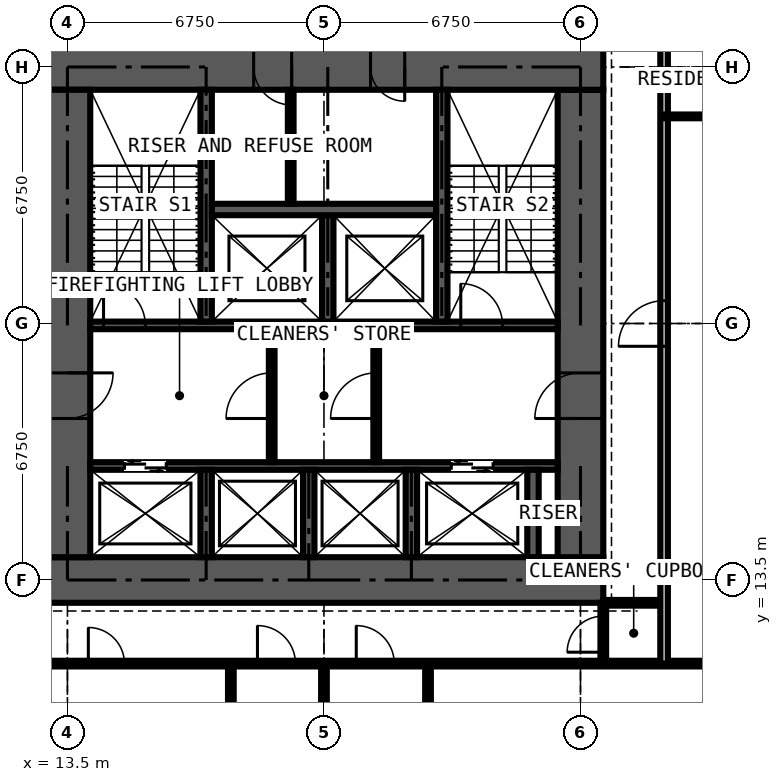
"""IFC4 building model, lengths in metres.
Left out: names, types, materials, properties, quantities, classifications, styles, units other than length and angle.
Written with IfcOpenShell. Run it as: python <this file> out.ifc"""

import sys

from ifc_helpers import new_model, si_unit, direction, frame, frame_2d, origin, place, context, subcontext, project, spatial, rectangle, extrude, element, fill, save


model = new_model("IFC4")
c1 = context("Model", 3, precision=1e-05, world=origin(), true_north=direction((0.0, 1.0)))
c2 = subcontext(c1, "Body", "Model", "MODEL_VIEW")
j1 = project(units=[si_unit("LENGTHUNIT", "METRE"), si_unit("PLANEANGLEUNIT", "RADIAN")], contexts=[c1])
p1 = place(None, origin())
s1 = spatial("IfcSite", under=j1, at=p1, CompositionType="ELEMENT")
p2 = place(p1, origin())
s2 = spatial("IfcBuilding", under=s1, at=p2, CompositionType="ELEMENT")
p3 = place(p2, frame((0.0, 0.0, 39.6)))
s3 = spatial("IfcBuildingStorey", under=s2, at=p3, CompositionType="ELEMENT", Elevation=39.6)
p4 = place(p3, frame((12.9, 13.5, 0.0), z_axis=(0.0, 0.0, 1.0), x_axis=(1.0, 0.0, 0.0)))
e1 = element("IfcWall", 1, at=p4, inside=s3, PredefinedType="SHEAR", context=c2, shape_type="SweptSolid", body=[
    extrude(rectangle(XDim=14.7, YDim=1.2, at=frame_2d((7.35, 0.0))), origin(), (0.0, 0.0, 1.0), 3.6),
])
p5 = place(p3, frame((27.0, 14.1, 0.0), z_axis=(0.0, 0.0, 1.0), x_axis=(0.0, 1.0, 0.0)))
e2 = element("IfcWall", 2, at=p5, inside=s3, PredefinedType="SHEAR", context=c2, shape_type="SweptSolid", body=[
    extrude(rectangle(XDim=12.3, YDim=1.2, at=frame_2d((6.15, 0.0))), origin(), (0.0, 0.0, 1.0), 3.6),
])
p6 = place(p5, frame((3.65, 0.0, 0.0)))
e3 = element("IfcOpeningElement", 3, at=p6, cuts=e2, PredefinedType="OPENING", context=c2, shape_type="SweptSolid", body=[
    extrude(rectangle(XDim=1.2, YDim=2.2, at=frame_2d((0.6, 1.1))), frame((0.0, 0.61, 0.0), z_axis=(0.0, -1.0, 0.0), x_axis=(1.0, 0.0, 0.0)), (0.0, 0.0, 1.0), 1.22),
])
p7 = place(p3, frame((27.6, 27.0, 0.0), z_axis=(0.0, 0.0, 1.0), x_axis=(-1.0, 0.0, 0.0)))
e4 = element("IfcWall", 4, at=p7, inside=s3, PredefinedType="SHEAR", context=c2, shape_type="SweptSolid", body=[
    extrude(rectangle(XDim=14.7, YDim=1.2, at=frame_2d((7.35, 0.0))), origin(), (0.0, 0.0, 1.0), 3.6),
])
p8 = place(p7, frame((5.225, 0.0, 0.0)))
e5 = element("IfcOpeningElement", 5, at=p8, cuts=e4, PredefinedType="OPENING", context=c2, shape_type="SweptSolid", body=[
    extrude(rectangle(XDim=0.9, YDim=2.2, at=frame_2d((0.45, 1.1))), frame((0.0, 0.61, 0.0), z_axis=(0.0, -1.0, 0.0), x_axis=(1.0, 0.0, 0.0)), (0.0, 0.0, 1.0), 1.22),
])
p9 = place(p7, frame((8.2, 0.0, 0.0)))
e6 = element("IfcOpeningElement", 6, at=p9, cuts=e4, PredefinedType="OPENING", context=c2, shape_type="SweptSolid", body=[
    extrude(rectangle(XDim=1.0, YDim=2.2, at=frame_2d((0.5, 1.1))), frame((0.0, 0.61, 0.0), z_axis=(0.0, -1.0, 0.0), x_axis=(1.0, 0.0, 0.0)), (0.0, 0.0, 1.0), 1.22),
])
p10 = place(p3, frame((13.5, 26.4, 0.0), z_axis=(0.0, 0.0, 1.0), x_axis=(0.0, -1.0, 0.0)))
e7 = element("IfcWall", 7, at=p10, inside=s3, PredefinedType="SHEAR", context=c2, shape_type="SweptSolid", body=[
    extrude(rectangle(XDim=12.3, YDim=1.2, at=frame_2d((6.15, 0.0))), origin(), (0.0, 0.0, 1.0), 3.6),
])
p11 = place(p10, frame((7.45, 0.0, 0.0)))
e8 = element("IfcOpeningElement", 8, at=p11, cuts=e7, PredefinedType="OPENING", context=c2, shape_type="SweptSolid", body=[
    extrude(rectangle(XDim=1.2, YDim=2.2, at=frame_2d((0.6, 1.1))), frame((0.0, 0.61, 0.0), z_axis=(0.0, -1.0, 0.0), x_axis=(1.0, 0.0, 0.0)), (0.0, 0.0, 1.0), 1.22),
])
p12 = place(p3, frame((14.1, 16.5, 0.0), z_axis=(0.0, 0.0, 1.0), x_axis=(1.0, 0.0, 0.0)))
e9 = element("IfcWall", 9, at=p12, inside=s3, PredefinedType="SHEAR", context=c2, shape_type="SweptSolid", body=[
    extrude(rectangle(XDim=12.3, YDim=0.2, at=frame_2d((6.15, 0.0))), origin(), (0.0, 0.0, 1.0), 3.6),
])
p13 = place(p12, frame((0.9, 0.0, 0.0)))
e10 = element("IfcOpeningElement", 10, at=p13, cuts=e9, PredefinedType="OPENING", context=c2, shape_type="SweptSolid", body=[
    extrude(rectangle(XDim=1.1, YDim=2.2, at=frame_2d((0.55, 1.1))), frame((0.0, 0.11, 0.0), z_axis=(0.0, -1.0, 0.0), x_axis=(1.0, 0.0, 0.0)), (0.0, 0.0, 1.0), 0.22),
])
p14 = place(p12, frame((9.5, 0.0, 0.0)))
e11 = element("IfcOpeningElement", 11, at=p14, cuts=e9, PredefinedType="OPENING", context=c2, shape_type="SweptSolid", body=[
    extrude(rectangle(XDim=1.1, YDim=2.2, at=frame_2d((0.55, 1.1))), frame((0.0, 0.11, 0.0), z_axis=(0.0, -1.0, 0.0), x_axis=(1.0, 0.0, 0.0)), (0.0, 0.0, 1.0), 0.22),
])
p15 = place(p3, frame((14.1, 20.2, 0.0), z_axis=(0.0, 0.0, 1.0), x_axis=(1.0, 0.0, 0.0)))
e12 = element("IfcWall", 12, at=p15, inside=s3, PredefinedType="SHEAR", context=c2, shape_type="SweptSolid", body=[
    extrude(rectangle(XDim=12.3, YDim=0.2, at=frame_2d((6.15, 0.0))), origin(), (0.0, 0.0, 1.0), 3.6),
])
p16 = place(p15, frame((0.35, 0.0, 0.0)))
e13 = element("IfcOpeningElement", 13, at=p16, cuts=e12, PredefinedType="OPENING", context=c2, shape_type="SweptSolid", body=[
    extrude(rectangle(XDim=1.1, YDim=2.2, at=frame_2d((0.55, 1.1))), frame((0.0, 0.11, 0.0), z_axis=(0.0, -1.0, 0.0), x_axis=(1.0, 0.0, 0.0)), (0.0, 0.0, 1.0), 0.22),
])
p17 = place(p15, frame((9.75, 0.0, 0.0)))
e14 = element("IfcOpeningElement", 14, at=p17, cuts=e12, PredefinedType="OPENING", context=c2, shape_type="SweptSolid", body=[
    extrude(rectangle(XDim=1.1, YDim=2.2, at=frame_2d((0.55, 1.1))), frame((0.0, 0.11, 0.0), z_axis=(0.0, -1.0, 0.0), x_axis=(1.0, 0.0, 0.0)), (0.0, 0.0, 1.0), 0.22),
])
for number, where, z_axis, x_axis in (
    (15, (17.15, 20.3, 0.0), (0.0, 0.0, 1.0), (0.0, 1.0, 0.0)),
    (16, (23.35, 20.3, 0.0), (0.0, 0.0, 1.0), (0.0, 1.0, 0.0)),
):
    element("IfcWall", number, at=place(p3, frame(where, z_axis=z_axis, x_axis=x_axis)), inside=s3, PredefinedType="SHEAR", context=c2, shape_type="SweptSolid", body=[
        extrude(rectangle(XDim=6.1, YDim=0.3, at=frame_2d((3.05, 0.0))), origin(), (0.0, 0.0, 1.0), 3.6),
    ])
p18 = place(p3, frame((20.35, 20.3, 0.0), z_axis=(0.0, 0.0, 1.0), x_axis=(0.0, 1.0, 0.0)))
e17 = element("IfcWall", 17, at=p18, inside=s3, PredefinedType="SHEAR", context=c2, shape_type="SweptSolid", body=[
    extrude(rectangle(XDim=2.8, YDim=0.3, at=frame_2d((1.4, 0.0))), origin(), (0.0, 0.0, 1.0), 3.6),
])
p19 = place(p3, frame((17.3, 23.25, 0.0), z_axis=(0.0, 0.0, 1.0), x_axis=(1.0, 0.0, 0.0)))
e18 = element("IfcWall", 18, at=p19, inside=s3, PredefinedType="SHEAR", context=c2, shape_type="SweptSolid", body=[
    extrude(rectangle(XDim=5.9, YDim=0.3, at=frame_2d((2.95, 0.0))), origin(), (0.0, 0.0, 1.0), 3.6),
])
for number, where, z_axis, x_axis in (
    (19, (17.15, 14.1, 0.0), (0.0, 0.0, 1.0), (0.0, 1.0, 0.0)),
    (20, (19.85, 14.1, 0.0), (0.0, 0.0, 1.0), (0.0, 1.0, 0.0)),
    (21, (22.55, 14.1, 0.0), (0.0, 0.0, 1.0), (0.0, 1.0, 0.0)),
    (22, (25.75, 14.1, 0.0), (0.0, 0.0, 1.0), (0.0, 1.0, 0.0)),
):
    element("IfcWall", number, at=place(p3, frame(where, z_axis=z_axis, x_axis=x_axis)), inside=s3, PredefinedType="SHEAR", context=c2, shape_type="SweptSolid", body=[
        extrude(rectangle(XDim=2.3, YDim=0.3, at=frame_2d((1.15, 0.0))), origin(), (0.0, 0.0, 1.0), 3.6),
    ])
p20 = place(p3, frame((18.875, 16.6, 0.0), z_axis=(0.0, 0.0, 1.0), x_axis=(0.0, 1.0, 0.0)))
e23 = element("IfcWall", 23, at=p20, inside=s3, PredefinedType="PARTITIONING", context=c2, shape_type="SweptSolid", body=[
    extrude(rectangle(XDim=3.5, YDim=0.15, at=frame_2d((1.75, 0.0))), origin(), (0.0, 0.0, 1.0), 3.375),
])
p21 = place(p20, frame((1.15, 0.0, 0.0)))
e24 = element("IfcOpeningElement", 24, at=p21, cuts=e23, PredefinedType="OPENING", context=c2, shape_type="SweptSolid", body=[
    extrude(rectangle(XDim=1.2, YDim=2.2, at=frame_2d((0.6, 1.1))), frame((0.0, 0.085, 0.0), z_axis=(0.0, -1.0, 0.0), x_axis=(1.0, 0.0, 0.0)), (0.0, 0.0, 1.0), 0.17),
])
p22 = place(p3, frame((21.625, 16.6, 0.0), z_axis=(0.0, 0.0, 1.0), x_axis=(0.0, 1.0, 0.0)))
e25 = element("IfcWall", 25, at=p22, inside=s3, PredefinedType="PARTITIONING", context=c2, shape_type="SweptSolid", body=[
    extrude(rectangle(XDim=3.5, YDim=0.15, at=frame_2d((1.75, 0.0))), origin(), (0.0, 0.0, 1.0), 3.375),
])
p23 = place(p22, frame((1.15, 0.0, 0.0)))
e26 = element("IfcOpeningElement", 26, at=p23, cuts=e25, PredefinedType="OPENING", context=c2, shape_type="SweptSolid", body=[
    extrude(rectangle(XDim=1.2, YDim=2.2, at=frame_2d((0.6, 1.1))), frame((0.0, 0.085, 0.0), z_axis=(0.0, -1.0, 0.0), x_axis=(1.0, 0.0, 0.0)), (0.0, 0.0, 1.0), 0.17),
])
p24 = place(p3, frame((19.375, 23.4, 0.0), z_axis=(0.0, 0.0, 1.0), x_axis=(0.0, 1.0, 0.0)))
e27 = element("IfcWall", 27, at=p24, inside=s3, PredefinedType="PARTITIONING", context=c2, shape_type="SweptSolid", body=[
    extrude(rectangle(XDim=3.0, YDim=0.15, at=frame_2d((1.5, 0.0))), origin(), (0.0, 0.0, 1.0), 3.375),
])
p25 = place(p3, frame((10.125, 11.3, 0.0), z_axis=(0.0, 0.0, 1.0), x_axis=(1.0, 0.0, 0.0)))
e28 = element("IfcWall", 28, at=p25, inside=s3, PredefinedType="PARTITIONING", context=c2, shape_type="SweptSolid", body=[
    extrude(rectangle(XDim=20.675, YDim=0.15, at=frame_2d((10.337, 0.0))), origin(), (0.0, 0.0, 1.0), 3.375),
])
p26 = place(p25, frame((8.375, 0.0, 0.0)))
e29 = element("IfcOpeningElement", 29, at=p26, cuts=e28, PredefinedType="OPENING", context=c2, shape_type="SweptSolid", body=[
    extrude(rectangle(XDim=1.0, YDim=2.2, at=frame_2d((0.5, 1.1))), frame((0.0, 0.085, 0.0), z_axis=(0.0, -1.0, 0.0), x_axis=(1.0, 0.0, 0.0)), (0.0, 0.0, 1.0), 0.17),
])
p27 = place(p25, frame((10.975, 0.0, 0.0)))
e30 = element("IfcOpeningElement", 30, at=p27, cuts=e28, PredefinedType="OPENING", context=c2, shape_type="SweptSolid", body=[
    extrude(rectangle(XDim=1.0, YDim=2.2, at=frame_2d((0.5, 1.1))), frame((0.0, 0.085, 0.0), z_axis=(0.0, -1.0, 0.0), x_axis=(1.0, 0.0, 0.0)), (0.0, 0.0, 1.0), 0.17),
])
p28 = place(p25, frame((3.925, 0.0, 0.0)))
e31 = element("IfcOpeningElement", 31, at=p28, cuts=e28, PredefinedType="OPENING", context=c2, shape_type="SweptSolid", body=[
    extrude(rectangle(XDim=0.95, YDim=2.2, at=frame_2d((0.475, 1.1))), frame((0.0, 0.085, 0.0), z_axis=(0.0, -1.0, 0.0), x_axis=(1.0, 0.0, 0.0)), (0.0, 0.0, 1.0), 0.17),
])
p29 = place(p3, frame((17.8, 5.65, 0.0), z_axis=(0.0, 0.0, 1.0), x_axis=(0.0, 1.0, 0.0)))
e32 = element("IfcWall", 32, at=p29, inside=s3, PredefinedType="PARTITIONING", context=c2, shape_type="SweptSolid", body=[
    extrude(rectangle(XDim=5.65, YDim=0.15, at=frame_2d((2.825, 0.0))), origin(), (0.0, 0.0, 1.0), 3.375),
])
p30 = place(p3, frame((20.25, -0.734, 0.0), z_axis=(0.0, 0.0, 1.0), x_axis=(0.0, 1.0, 0.0)))
e33 = element("IfcWall", 33, at=p30, inside=s3, PredefinedType="PARTITIONING", context=c2, shape_type="SweptSolid", body=[
    extrude(rectangle(XDim=12.034, YDim=0.15, at=frame_2d((6.017, 0.0))), origin(), (0.0, 0.0, 1.0), 2.61),
])
p31 = place(p3, frame((22.988, 5.65, 0.0), z_axis=(0.0, 0.0, 1.0), x_axis=(0.0, 1.0, 0.0)))
e34 = element("IfcWall", 34, at=p31, inside=s3, PredefinedType="PARTITIONING", context=c2, shape_type="SweptSolid", body=[
    extrude(rectangle(XDim=5.65, YDim=0.15, at=frame_2d((2.825, 0.0))), origin(), (0.0, 0.0, 1.0), 3.375),
])
p32 = place(p3, frame((27.6, 11.3, 0.0), z_axis=(0.0, 0.0, 1.0), x_axis=(0.0, 1.0, 0.0)))
e35 = element("IfcWall", 35, at=p32, inside=s3, PredefinedType="PARTITIONING", context=c2, shape_type="SweptSolid", body=[
    extrude(rectangle(XDim=1.6, YDim=0.15, at=frame_2d((0.8, 0.0))), origin(), (0.0, 0.0, 1.0), 3.375),
])
p33 = place(p32, frame((0.3, 0.0, 0.0)))
e36 = element("IfcOpeningElement", 36, at=p33, cuts=e35, PredefinedType="OPENING", context=c2, shape_type="SweptSolid", body=[
    extrude(rectangle(XDim=0.95, YDim=2.2, at=frame_2d((0.475, 1.1))), frame((0.0, 0.085, 0.0), z_axis=(0.0, -1.0, 0.0), x_axis=(1.0, 0.0, 0.0)), (0.0, 0.0, 1.0), 0.17),
])
p34 = place(p3, frame((27.6, 12.9, 0.0), z_axis=(0.0, 0.0, 1.0), x_axis=(1.0, 0.0, 0.0)))
e37 = element("IfcWall", 37, at=p34, inside=s3, PredefinedType="PARTITIONING", context=c2, shape_type="SweptSolid", body=[
    extrude(rectangle(XDim=1.6, YDim=0.15, at=frame_2d((0.8, 0.0))), origin(), (0.0, 0.0, 1.0), 2.877),
])
p35 = place(p3, frame((29.2, 11.3, 0.0), z_axis=(0.0, 0.0, 1.0), x_axis=(0.0, 1.0, 0.0)))
e38 = element("IfcWall", 38, at=p35, inside=s3, PredefinedType="PARTITIONING", context=c2, shape_type="SweptSolid", body=[
    extrude(rectangle(XDim=17.9, YDim=0.2, at=frame_2d((8.95, 0.0))), origin(), (0.0, 0.0, 1.0), 3.375),
])
p36 = place(p35, frame((8.35, 0.0, 0.0)))
e39 = element("IfcOpeningElement", 39, at=p36, cuts=e38, PredefinedType="OPENING", context=c2, shape_type="SweptSolid", body=[
    extrude(rectangle(XDim=1.2, YDim=2.2, at=frame_2d((0.6, 1.1))), frame((0.0, 0.11, 0.0), z_axis=(0.0, -1.0, 0.0), x_axis=(1.0, 0.0, 0.0)), (0.0, 0.0, 1.0), 0.22),
])
p37 = place(p3, frame((29.2, 25.7, 0.0), z_axis=(0.0, 0.0, 1.0), x_axis=(1.0, 0.0, 0.0)))
e40 = element("IfcWall", 40, at=p37, inside=s3, PredefinedType="SHEAR", context=c2, shape_type="SweptSolid", body=[
    extrude(rectangle(XDim=3.45, YDim=0.1, at=frame_2d((1.725, 0.0))), origin(), (0.0, 0.0, 1.0), 3.375),
])
p38 = place(p13, origin())
e41 = element("IfcDoor", 41, at=p38, inside=s3, OperationType="DOUBLE_DOOR_SLIDING", PredefinedType="DOOR", context=c2, shape_type="SweptSolid", body=[
    extrude(rectangle(XDim=1.1, YDim=2.2, at=frame_2d((0.55, 1.1))), frame((0.0, 0.025, 0.0), z_axis=(0.0, -1.0, 0.0), x_axis=(1.0, 0.0, 0.0)), (0.0, 0.0, 1.0), 0.05),
])
fill(e10, e41)
p39 = place(p14, origin())
e42 = element("IfcDoor", 42, at=p39, inside=s3, OperationType="DOUBLE_DOOR_SLIDING", PredefinedType="DOOR", context=c2, shape_type="SweptSolid", body=[
    extrude(rectangle(XDim=1.1, YDim=2.2, at=frame_2d((0.55, 1.1))), frame((0.0, 0.025, 0.0), z_axis=(0.0, -1.0, 0.0), x_axis=(1.0, 0.0, 0.0)), (0.0, 0.0, 1.0), 0.05),
])
fill(e11, e42)
p40 = place(p11, origin())
e43 = element("IfcDoor", 43, at=p40, inside=s3, OperationType="DOUBLE_DOOR_SINGLE_SWING", PredefinedType="DOOR", context=c2, shape_type="SweptSolid", body=[
    extrude(rectangle(XDim=1.2, YDim=2.2, at=frame_2d((0.6, 1.1))), frame((0.0, 0.025, 0.0), z_axis=(0.0, -1.0, 0.0), x_axis=(1.0, 0.0, 0.0)), (0.0, 0.0, 1.0), 0.05),
])
fill(e8, e43)
p41 = place(p6, origin())
e44 = element("IfcDoor", 44, at=p41, inside=s3, OperationType="DOUBLE_DOOR_SINGLE_SWING", PredefinedType="DOOR", context=c2, shape_type="SweptSolid", body=[
    extrude(rectangle(XDim=1.2, YDim=2.2, at=frame_2d((0.6, 1.1))), frame((0.0, 0.025, 0.0), z_axis=(0.0, -1.0, 0.0), x_axis=(1.0, 0.0, 0.0)), (0.0, 0.0, 1.0), 0.05),
])
fill(e3, e44)
p42 = place(p21, origin())
e45 = element("IfcDoor", 45, at=p42, inside=s3, OperationType="DOUBLE_DOOR_SINGLE_SWING", PredefinedType="DOOR", context=c2, shape_type="SweptSolid", body=[
    extrude(rectangle(XDim=1.2, YDim=2.2, at=frame_2d((0.6, 1.1))), frame((0.0, 0.025, 0.0), z_axis=(0.0, -1.0, 0.0), x_axis=(1.0, 0.0, 0.0)), (0.0, 0.0, 1.0), 0.05),
])
fill(e24, e45)
p43 = place(p23, origin())
e46 = element("IfcDoor", 46, at=p43, inside=s3, OperationType="DOUBLE_DOOR_SINGLE_SWING", PredefinedType="DOOR", context=c2, shape_type="SweptSolid", body=[
    extrude(rectangle(XDim=1.2, YDim=2.2, at=frame_2d((0.6, 1.1))), frame((0.0, 0.025, 0.0), z_axis=(0.0, -1.0, 0.0), x_axis=(1.0, 0.0, 0.0)), (0.0, 0.0, 1.0), 0.05),
])
fill(e26, e46)
p44 = place(p8, origin())
e47 = element("IfcDoor", 47, at=p44, inside=s3, OperationType="SINGLE_SWING_LEFT", PredefinedType="DOOR", context=c2, shape_type="SweptSolid", body=[
    extrude(rectangle(XDim=0.9, YDim=2.2, at=frame_2d((0.45, 1.1))), frame((0.0, 0.4, 0.0), z_axis=(0.0, -1.0, 0.0), x_axis=(1.0, 0.0, 0.0)), (0.0, 0.0, 1.0), 0.8),
])
fill(e5, e47)
p45 = place(p9, origin())
e48 = element("IfcDoor", 48, at=p45, inside=s3, OperationType="SINGLE_SWING_LEFT", PredefinedType="DOOR", context=c2, shape_type="SweptSolid", body=[
    extrude(rectangle(XDim=1.0, YDim=2.2, at=frame_2d((0.5, 1.1))), frame((0.0, 0.025, 0.0), z_axis=(0.0, -1.0, 0.0), x_axis=(1.0, 0.0, 0.0)), (0.0, 0.0, 1.0), 0.05),
])
fill(e6, e48)
p46 = place(p16, origin())
e49 = element("IfcDoor", 49, at=p46, inside=s3, OperationType="SINGLE_SWING_LEFT", PredefinedType="DOOR", context=c2, shape_type="SweptSolid", body=[
    extrude(rectangle(XDim=1.1, YDim=2.2, at=frame_2d((0.55, 1.1))), frame((0.0, 0.025, 0.0), z_axis=(0.0, -1.0, 0.0), x_axis=(1.0, 0.0, 0.0)), (0.0, 0.0, 1.0), 0.05),
])
fill(e13, e49)
p47 = place(p17, origin())
e50 = element("IfcDoor", 50, at=p47, inside=s3, OperationType="SINGLE_SWING_LEFT", PredefinedType="DOOR", context=c2, shape_type="SweptSolid", body=[
    extrude(rectangle(XDim=1.1, YDim=2.2, at=frame_2d((0.55, 1.1))), frame((0.0, 0.025, 0.0), z_axis=(0.0, -1.0, 0.0), x_axis=(1.0, 0.0, 0.0)), (0.0, 0.0, 1.0), 0.05),
])
fill(e14, e50)
p48 = place(p33, origin())
e51 = element("IfcDoor", 51, at=p48, inside=s3, OperationType="SINGLE_SWING_LEFT", PredefinedType="DOOR", context=c2, shape_type="SweptSolid", body=[
    extrude(rectangle(XDim=0.95, YDim=2.2, at=frame_2d((0.475, 1.1))), frame((0.0, 0.025, 0.0), z_axis=(0.0, -1.0, 0.0), x_axis=(1.0, 0.0, 0.0)), (0.0, 0.0, 1.0), 0.05),
])
fill(e36, e51)
p49 = place(p26, origin())
e52 = element("IfcDoor", 52, at=p49, inside=s3, OperationType="SINGLE_SWING_LEFT", PredefinedType="DOOR", context=c2, shape_type="SweptSolid", body=[
    extrude(rectangle(XDim=1.0, YDim=2.2, at=frame_2d((0.5, 1.1))), frame((0.0, 0.025, 0.0), z_axis=(0.0, -1.0, 0.0), x_axis=(1.0, 0.0, 0.0)), (0.0, 0.0, 1.0), 0.05),
])
fill(e29, e52)
p50 = place(p27, origin())
e53 = element("IfcDoor", 53, at=p50, inside=s3, OperationType="SINGLE_SWING_LEFT", PredefinedType="DOOR", context=c2, shape_type="SweptSolid", body=[
    extrude(rectangle(XDim=1.0, YDim=2.2, at=frame_2d((0.5, 1.1))), frame((0.0, 0.025, 0.0), z_axis=(0.0, -1.0, 0.0), x_axis=(1.0, 0.0, 0.0)), (0.0, 0.0, 1.0), 0.05),
])
fill(e30, e53)
p51 = place(p28, origin())
e54 = element("IfcDoor", 54, at=p51, inside=s3, OperationType="SINGLE_SWING_LEFT", PredefinedType="DOOR", context=c2, shape_type="SweptSolid", body=[
    extrude(rectangle(XDim=0.95, YDim=2.2, at=frame_2d((0.475, 1.1))), frame((0.0, 0.025, 0.0), z_axis=(0.0, -1.0, 0.0), x_axis=(1.0, 0.0, 0.0)), (0.0, 0.0, 1.0), 0.05),
])
fill(e31, e54)
p52 = place(p36, origin())
e55 = element("IfcDoor", 55, at=p52, inside=s3, OperationType="DOUBLE_DOOR_SINGLE_SWING", PredefinedType="DOOR", context=c2, shape_type="SweptSolid", body=[
    extrude(rectangle(XDim=1.2, YDim=2.2, at=frame_2d((0.6, 1.1))), frame((0.0, 0.025, 0.0), z_axis=(0.0, -1.0, 0.0), x_axis=(1.0, 0.0, 0.0)), (0.0, 0.0, 1.0), 0.05),
])
fill(e39, e55)
save(model, sys.argv[1])
